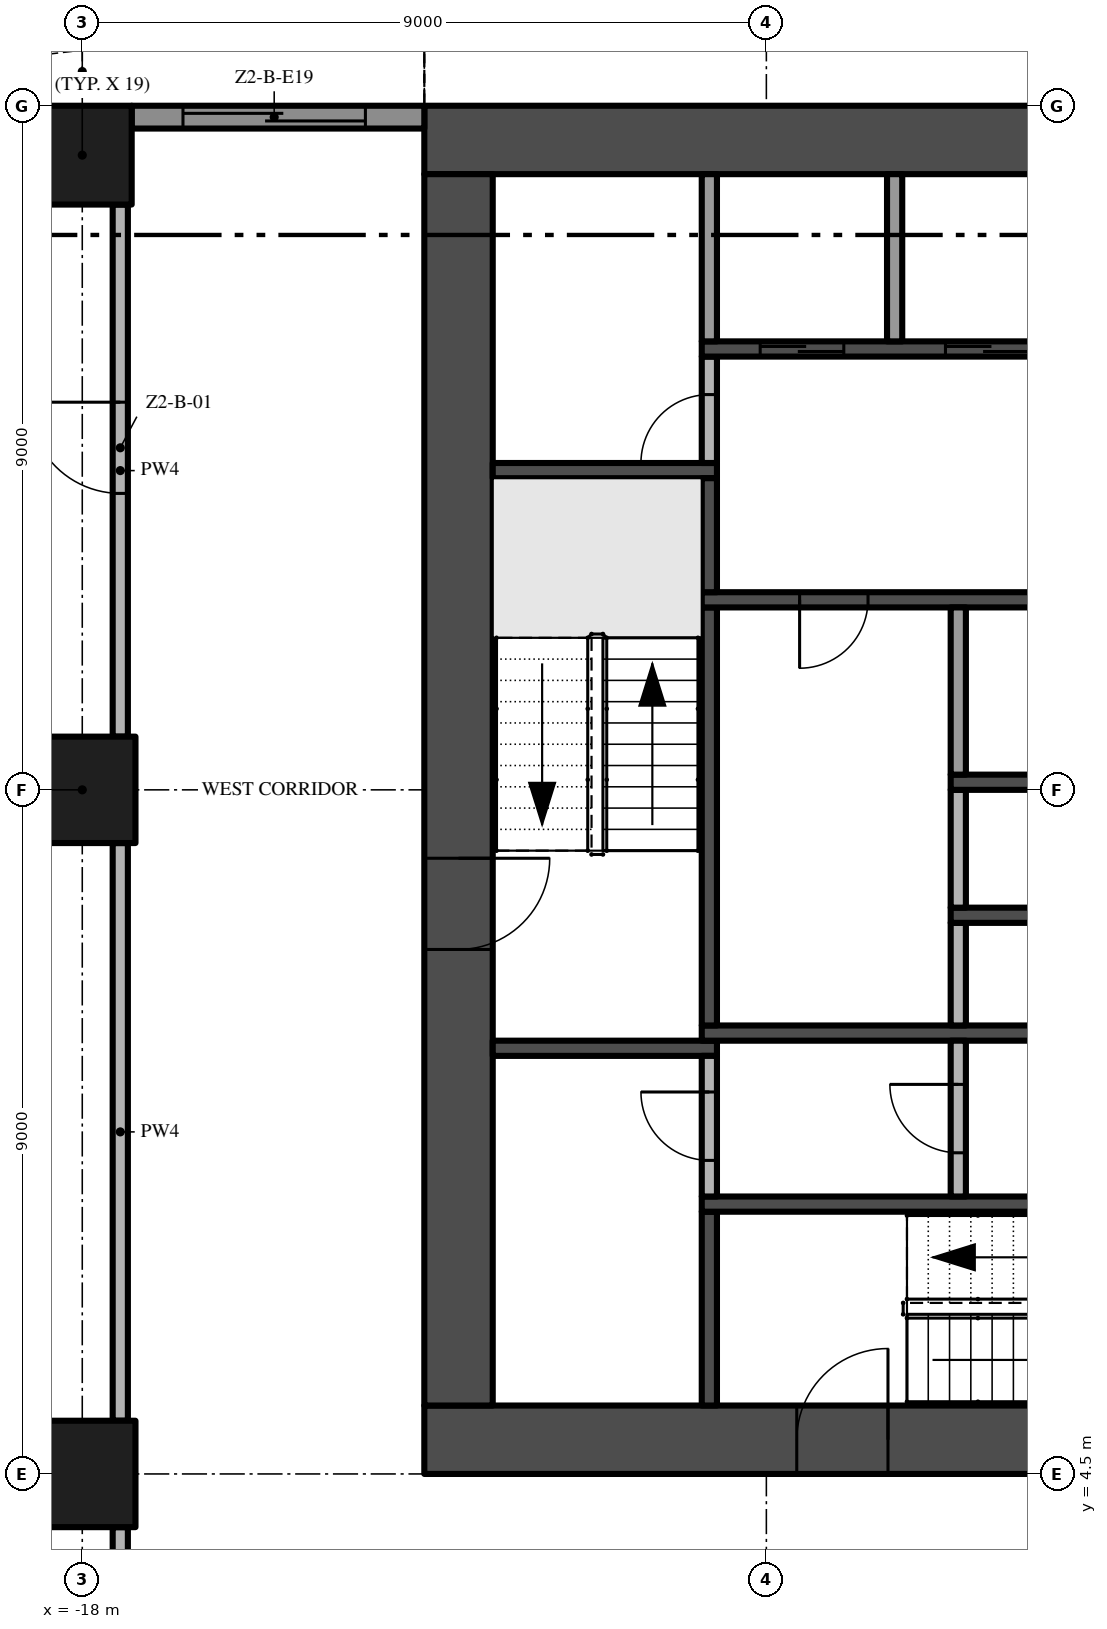
"""IFC4 building model, lengths in metres.
Left out: names, types, materials, properties, quantities, classifications, styles, units other than length and angle.
Written with IfcOpenShell. Run it as: python <this file> out.ifc"""

import sys

from ifc_helpers import new_model, si_unit, direction, frame, frame_2d, origin, origin_2d, place, context, subcontext, project, spatial, polyline, rectangle, outline, extrude, element, fill, save


model = new_model("IFC4")
c1 = context("Model", 3, precision=1e-05, world=origin(), true_north=direction((0.0, 1.0)))
c2 = subcontext(c1, "Body", "Model", "MODEL_VIEW")
j1 = project(units=[si_unit("LENGTHUNIT", "METRE"), si_unit("PLANEANGLEUNIT", "RADIAN")], contexts=[c1])
p1 = place(None, origin())
s1 = spatial("IfcSite", under=j1, at=p1, CompositionType="ELEMENT")
p2 = place(p1, origin())
s2 = spatial("IfcBuilding", under=s1, at=p2, CompositionType="ELEMENT")
p3 = place(p2, frame((0.0, 0.0, 88.4)))
s3 = spatial("IfcBuildingStorey", under=s2, at=p3, CompositionType="ELEMENT", Elevation=88.4)
p4 = place(p3, frame((-13.5, 4.95, -0.3), z_axis=(0.0, 0.0, 1.0), x_axis=(1.0, 0.0, 0.0)))
e1 = element("IfcWall", 1, at=p4, inside=s3, PredefinedType="SHEAR", context=c2, shape_type="SweptSolid", body=[
    extrude(rectangle(XDim=27.0, YDim=0.9, at=frame_2d((13.5, 0.0))), origin(), (0.0, 0.0, 1.0), 3.8),
])
p5 = place(p4, frame((12.0, 0.0, 0.3)))
e2 = element("IfcOpeningElement", 2, at=p5, cuts=e1, PredefinedType="OPENING", context=c2, shape_type="SweptSolid", body=[
    extrude(rectangle(XDim=3.0, YDim=2.4, at=frame_2d((1.5, 1.2))), frame((0.0, 0.46, 0.0), z_axis=(0.0, -1.0, 0.0), x_axis=(1.0, 0.0, 0.0)), (0.0, 0.0, 1.0), 0.92),
])
p6 = place(p4, frame((4.9, 0.0, 0.3)))
e3 = element("IfcOpeningElement", 3, at=p6, cuts=e1, PredefinedType="OPENING", context=c2, shape_type="SweptSolid", body=[
    extrude(rectangle(XDim=1.2, YDim=2.2, at=frame_2d((0.6, 1.1))), frame((0.0, 0.46, 0.0), z_axis=(0.0, -1.0, 0.0), x_axis=(1.0, 0.0, 0.0)), (0.0, 0.0, 1.0), 0.92),
])
p7 = place(p4, frame((20.75, 0.0, 0.3)))
e4 = element("IfcOpeningElement", 4, at=p7, cuts=e1, PredefinedType="OPENING", context=c2, shape_type="SweptSolid", body=[
    extrude(rectangle(XDim=1.5, YDim=2.2, at=frame_2d((0.75, 1.1))), frame((0.0, 0.46, 0.0), z_axis=(0.0, -1.0, 0.0), x_axis=(1.0, 0.0, 0.0)), (0.0, 0.0, 1.0), 0.92),
])
p8 = place(p4, frame((17.4, 0.0, 0.3)))
e5 = element("IfcOpeningElement", 5, at=p8, cuts=e1, PredefinedType="OPENING", context=c2, shape_type="SweptSolid", body=[
    extrude(rectangle(XDim=1.2, YDim=2.2, at=frame_2d((0.6, 1.1))), frame((0.0, 0.46, 0.0), z_axis=(0.0, -1.0, 0.0), x_axis=(1.0, 0.0, 0.0)), (0.0, 0.0, 1.0), 0.92),
])
p9 = place(p3, frame((13.5, 22.05, -0.3), z_axis=(0.0, 0.0, 1.0), x_axis=(-1.0, 0.0, 0.0)))
e6 = element("IfcWall", 6, at=p9, inside=s3, PredefinedType="SHEAR", context=c2, shape_type="SweptSolid", body=[
    extrude(rectangle(XDim=27.0, YDim=0.9, at=frame_2d((13.5, 0.0))), origin(), (0.0, 0.0, 1.0), 3.8),
])
p10 = place(p3, frame((-13.05, 21.6, -0.3), z_axis=(0.0, 0.0, 1.0), x_axis=(0.0, -1.0, 0.0)))
e7 = element("IfcWall", 7, at=p10, inside=s3, PredefinedType="SHEAR", context=c2, shape_type="SweptSolid", body=[
    extrude(rectangle(XDim=16.2, YDim=0.9, at=frame_2d((8.1, 0.0))), origin(), (0.0, 0.0, 1.0), 3.8),
])
p11 = place(p10, frame((9.0, 0.0, 0.3)))
e8 = element("IfcOpeningElement", 8, at=p11, cuts=e7, PredefinedType="OPENING", context=c2, shape_type="SweptSolid", body=[
    extrude(rectangle(XDim=1.2, YDim=2.2, at=frame_2d((0.6, 1.1))), frame((0.0, 0.46, 0.0), z_axis=(0.0, -1.0, 0.0), x_axis=(1.0, 0.0, 0.0)), (0.0, 0.0, 1.0), 0.92),
])
p12 = place(p3, frame((-18.0, 13.5, 0.0), z_axis=(0.0, 0.0, 1.0), x_axis=(1.0, 0.0, 0.0)))
e9 = element("IfcColumn", 9, at=p12, inside=s3, PredefinedType="COLUMN", context=c2, shape_type="SweptSolid", body=[
    extrude(rectangle(XDim=1.4, YDim=1.4, at=origin_2d()), origin(), (0.0, 0.0, 1.0), 3.5),
])
p13 = place(p3, frame((-18.0, 21.85, 0.0), z_axis=(0.0, 0.0, 1.0), x_axis=(1.0, 0.0, 0.0)))
e10 = element("IfcColumn", 10, at=p13, inside=s3, PredefinedType="COLUMN", context=c2, shape_type="SweptSolid", body=[
    extrude(rectangle(XDim=1.3, YDim=1.3, at=origin_2d()), origin(), (0.0, 0.0, 1.0), 3.5),
])
p14 = place(p3, frame((-18.0, 4.5, 0.0), z_axis=(0.0, 0.0, 1.0), x_axis=(1.0, 0.0, 0.0)))
e11 = element("IfcColumn", 11, at=p14, inside=s3, PredefinedType="COLUMN", context=c2, shape_type="SweptSolid", body=[
    extrude(rectangle(XDim=1.4, YDim=1.4, at=origin_2d()), origin(), (0.0, 0.0, 1.0), 3.5),
])
p15 = place(p3, frame((-17.35, 22.35, 0.0), z_axis=(0.0, 0.0, 1.0), x_axis=(1.0, 0.0, 0.0)))
e12 = element("IfcWall", 12, at=p15, inside=s3, PredefinedType="SOLIDWALL", context=c2, shape_type="SweptSolid", body=[
    extrude(rectangle(XDim=3.85, YDim=0.3, at=frame_2d((1.925, 0.0))), origin(), (0.0, 0.0, 1.0), 3.5),
])
p16 = place(p15, frame((0.675, 0.0, 0.0)))
e13 = element("IfcOpeningElement", 13, at=p16, cuts=e12, PredefinedType="OPENING", context=c2, shape_type="SweptSolid", body=[
    extrude(rectangle(XDim=2.4, YDim=2.4, at=frame_2d((1.2, 1.2))), frame((0.0, 0.16, 0.0), z_axis=(0.0, -1.0, 0.0), x_axis=(1.0, 0.0, 0.0)), (0.0, 0.0, 1.0), 0.32),
])
p17 = place(p3, origin())
e14 = element("IfcWall", 14, at=p17, inside=s3, PredefinedType="USERDEFINED", context=c2, shape_type="SweptSolid", body=[
    extrude(outline(polyline([(-13.5, 25.149), (-15.0, 24.488), (-16.5, 23.755), (-18.0, 23.231), (-19.125, 23.1), (-19.5, 23.115), (-21.0, 23.451), (-22.5, 24.112), (-22.601, 23.883), (-21.079, 23.213), (-19.533, 22.866), (-19.115, 22.849), (-17.944, 22.986), (-16.404, 23.524), (-14.895, 24.261), (-13.399, 24.92), (-13.5, 25.149)])), origin(), (0.0, 0.0, 1.0), 0.9),
])
for number, where, z_axis, x_axis in (
    (15, (-12.6, 10.1, 0.0), (0.0, 0.0, 1.0), (1.0, 0.0, 0.0)),
    (16, (-12.6, 17.7, 0.0), (0.0, 0.0, 1.0), (1.0, 0.0, 0.0)),
):
    element("IfcWall", number, at=place(p3, frame(where, z_axis=z_axis, x_axis=x_axis)), inside=s3, PredefinedType="SHEAR", context=c2, shape_type="SweptSolid", body=[
        extrude(rectangle(XDim=2.95, YDim=0.2, at=frame_2d((1.475, 0.0))), origin(), (0.0, 0.0, 1.0), 3.5),
    ])
p18 = place(p3, frame((-9.75, 5.4, 0.0), z_axis=(0.0, 0.0, 1.0), x_axis=(0.0, 1.0, 0.0)))
e17 = element("IfcWall", 17, at=p18, inside=s3, PredefinedType="SHEAR", context=c2, shape_type="SweptSolid", body=[
    extrude(rectangle(XDim=2.55, YDim=0.2, at=frame_2d((1.275, 0.0))), origin(), (0.0, 0.0, 1.0), 3.5),
])
p19 = place(p3, frame((-9.85, 8.05, 0.0), z_axis=(0.0, 0.0, 1.0), x_axis=(1.0, 0.0, 0.0)))
e18 = element("IfcWall", 18, at=p19, inside=s3, PredefinedType="SHEAR", context=c2, shape_type="SweptSolid", body=[
    extrude(rectangle(XDim=8.35, YDim=0.2, at=frame_2d((4.175, 0.0))), origin(), (0.0, 0.0, 1.0), 3.5),
])
p20 = place(p3, frame((-9.75, 8.15, 0.0), z_axis=(0.0, 0.0, 1.0), x_axis=(0.0, 1.0, 0.0)))
e19 = element("IfcWall", 19, at=p20, inside=s3, PredefinedType="PARTITIONING", context=c2, shape_type="SweptSolid", body=[
    extrude(rectangle(XDim=1.85, YDim=0.2, at=frame_2d((0.925, 0.0))), origin(), (0.0, 0.0, 1.0), 3.5),
])
p21 = place(p20, frame((0.475, 0.0, 0.0)))
e20 = element("IfcOpeningElement", 20, at=p21, cuts=e19, PredefinedType="OPENING", context=c2, shape_type="SweptSolid", body=[
    extrude(rectangle(XDim=0.9, YDim=2.1, at=frame_2d((0.45, 1.05))), frame((0.0, 0.11, 0.0), z_axis=(0.0, -1.0, 0.0), x_axis=(1.0, 0.0, 0.0)), (0.0, 0.0, 1.0), 0.22),
])
p22 = place(p3, frame((-9.85, 10.3, 0.0), z_axis=(0.0, 0.0, 1.0), x_axis=(1.0, 0.0, 0.0)))
e21 = element("IfcWall", 21, at=p22, inside=s3, PredefinedType="SHEAR", context=c2, shape_type="SweptSolid", body=[
    extrude(rectangle(XDim=8.35, YDim=0.2, at=frame_2d((4.175, 0.0))), origin(), (0.0, 0.0, 1.0), 3.5),
])
p23 = place(p3, frame((-9.75, 10.4, 0.0), z_axis=(0.0, 0.0, 1.0), x_axis=(0.0, 1.0, 0.0)))
e22 = element("IfcWall", 22, at=p23, inside=s3, PredefinedType="SHEAR", context=c2, shape_type="SweptSolid", body=[
    extrude(rectangle(XDim=5.5, YDim=0.2, at=frame_2d((2.75, 0.0))), origin(), (0.0, 0.0, 1.0), 3.5),
])
p24 = place(p3, frame((-1.5, 16.0, 0.0), z_axis=(0.0, 0.0, 1.0), x_axis=(-1.0, 0.0, 0.0)))
e23 = element("IfcWall", 23, at=p24, inside=s3, PredefinedType="SHEAR", context=c2, shape_type="SweptSolid", body=[
    extrude(rectangle(XDim=8.35, YDim=0.2, at=frame_2d((4.175, 0.0))), origin(), (0.0, 0.0, 1.0), 3.5),
])
p25 = place(p24, frame((6.162, 0.0, 0.0)))
e24 = element("IfcOpeningElement", 24, at=p25, cuts=e23, PredefinedType="OPENING", context=c2, shape_type="SweptSolid", body=[
    extrude(rectangle(XDim=0.9, YDim=2.1, at=frame_2d((0.45, 1.05))), frame((0.0, 0.11, 0.0), z_axis=(0.0, -1.0, 0.0), x_axis=(1.0, 0.0, 0.0)), (0.0, 0.0, 1.0), 0.22),
])
p26 = place(p3, frame((-9.75, 16.1, 0.0), z_axis=(0.0, 0.0, 1.0), x_axis=(0.0, 1.0, 0.0)))
e25 = element("IfcWall", 25, at=p26, inside=s3, PredefinedType="SHEAR", context=c2, shape_type="SweptSolid", body=[
    extrude(rectangle(XDim=1.5, YDim=0.2, at=frame_2d((0.75, 0.0))), origin(), (0.0, 0.0, 1.0), 3.5),
])
p27 = place(p3, frame((-9.75, 17.8, 0.0), z_axis=(0.0, 0.0, 1.0), x_axis=(0.0, 1.0, 0.0)))
e26 = element("IfcWall", 26, at=p27, inside=s3, PredefinedType="PARTITIONING", context=c2, shape_type="SweptSolid", body=[
    extrude(rectangle(XDim=1.4, YDim=0.2, at=frame_2d((0.7, 0.0))), origin(), (0.0, 0.0, 1.0), 3.5),
])
p28 = place(p27, origin())
e27 = element("IfcOpeningElement", 27, at=p28, cuts=e26, PredefinedType="OPENING", context=c2, shape_type="SweptSolid", body=[
    extrude(rectangle(XDim=0.9, YDim=2.1, at=frame_2d((0.45, 1.05))), frame((0.0, 0.11, 0.0), z_axis=(0.0, -1.0, 0.0), x_axis=(1.0, 0.0, 0.0)), (0.0, 0.0, 1.0), 0.22),
])
p29 = place(p3, frame((-9.85, 19.3, 0.0), z_axis=(0.0, 0.0, 1.0), x_axis=(1.0, 0.0, 0.0)))
e28 = element("IfcWall", 28, at=p29, inside=s3, PredefinedType="SHEAR", context=c2, shape_type="SweptSolid", body=[
    extrude(rectangle(XDim=19.7, YDim=0.2, at=frame_2d((9.85, 0.0))), origin(), (0.0, 0.0, 1.0), 3.5),
])
p30 = place(p29, frame((0.769, 0.0, 0.0)))
e29 = element("IfcOpeningElement", 29, at=p30, cuts=e28, PredefinedType="OPENING", context=c2, shape_type="SweptSolid", body=[
    extrude(rectangle(XDim=1.1, YDim=2.1, at=frame_2d((0.55, 1.05))), frame((0.0, 0.11, 0.0), z_axis=(0.0, -1.0, 0.0), x_axis=(1.0, 0.0, 0.0)), (0.0, 0.0, 1.0), 0.22),
])
p31 = place(p29, frame((3.206, 0.0, 0.0)))
e30 = element("IfcOpeningElement", 30, at=p31, cuts=e28, PredefinedType="OPENING", context=c2, shape_type="SweptSolid", body=[
    extrude(rectangle(XDim=1.1, YDim=2.1, at=frame_2d((0.55, 1.05))), frame((0.0, 0.11, 0.0), z_axis=(0.0, -1.0, 0.0), x_axis=(1.0, 0.0, 0.0)), (0.0, 0.0, 1.0), 0.22),
])
p32 = place(p29, frame((5.644, 0.0, 0.0)))
e31 = element("IfcOpeningElement", 31, at=p32, cuts=e28, PredefinedType="OPENING", context=c2, shape_type="SweptSolid", body=[
    extrude(rectangle(XDim=1.1, YDim=2.1, at=frame_2d((0.55, 1.05))), frame((0.0, 0.11, 0.0), z_axis=(0.0, -1.0, 0.0), x_axis=(1.0, 0.0, 0.0)), (0.0, 0.0, 1.0), 0.22),
])
p33 = place(p29, frame((8.081, 0.0, 0.0)))
e32 = element("IfcOpeningElement", 32, at=p33, cuts=e28, PredefinedType="OPENING", context=c2, shape_type="SweptSolid", body=[
    extrude(rectangle(XDim=1.1, YDim=2.1, at=frame_2d((0.55, 1.05))), frame((0.0, 0.11, 0.0), z_axis=(0.0, -1.0, 0.0), x_axis=(1.0, 0.0, 0.0)), (0.0, 0.0, 1.0), 0.22),
])
for number, where, z_axis, x_axis in (
    (33, (-9.75, 19.4, 0.0), (0.0, 0.0, 1.0), (0.0, 1.0, 0.0)),
    (34, (-7.312, 19.4, 0.0), (0.0, 0.0, 1.0), (0.0, 1.0, 0.0)),
):
    element("IfcWall", number, at=place(p3, frame(where, z_axis=z_axis, x_axis=x_axis)), inside=s3, PredefinedType="PARTITIONING", context=c2, shape_type="SweptSolid", body=[
        extrude(rectangle(XDim=2.2, YDim=0.2, at=frame_2d((1.1, 0.0))), origin(), (0.0, 0.0, 1.0), 3.5),
    ])
p34 = place(p3, frame((-6.475, 8.15, 0.0), z_axis=(0.0, 0.0, 1.0), x_axis=(0.0, 1.0, 0.0)))
e35 = element("IfcWall", 35, at=p34, inside=s3, PredefinedType="PARTITIONING", context=c2, shape_type="SweptSolid", body=[
    extrude(rectangle(XDim=2.05, YDim=0.2, at=frame_2d((1.025, 0.0))), origin(), (0.0, 0.0, 1.0), 3.5),
])
p35 = place(p34, frame((0.575, 0.0, 0.0)))
e36 = element("IfcOpeningElement", 36, at=p35, cuts=e35, PredefinedType="OPENING", context=c2, shape_type="SweptSolid", body=[
    extrude(rectangle(XDim=0.9, YDim=2.1, at=frame_2d((0.45, 1.05))), frame((0.0, 0.11, 0.0), z_axis=(0.0, -1.0, 0.0), x_axis=(1.0, 0.0, 0.0)), (0.0, 0.0, 1.0), 0.22),
])
p36 = place(p3, frame((-6.475, 10.4, 0.0), z_axis=(0.0, 0.0, 1.0), x_axis=(0.0, 1.0, 0.0)))
e37 = element("IfcWall", 37, at=p36, inside=s3, PredefinedType="PARTITIONING", context=c2, shape_type="SweptSolid", body=[
    extrude(rectangle(XDim=1.35, YDim=0.2, at=frame_2d((0.675, 0.0))), origin(), (0.0, 0.0, 1.0), 3.5),
])
p37 = place(p3, frame((-6.575, 11.85, 0.0), z_axis=(0.0, 0.0, 1.0), x_axis=(1.0, 0.0, 0.0)))
e38 = element("IfcWall", 38, at=p37, inside=s3, PredefinedType="SHEAR", context=c2, shape_type="SweptSolid", body=[
    extrude(rectangle(XDim=5.075, YDim=0.2, at=frame_2d((2.538, 0.0))), origin(), (0.0, 0.0, 1.0), 3.5),
])
p38 = place(p3, frame((-6.475, 11.95, 0.0), z_axis=(0.0, 0.0, 1.0), x_axis=(0.0, 1.0, 0.0)))
e39 = element("IfcWall", 39, at=p38, inside=s3, PredefinedType="PARTITIONING", context=c2, shape_type="SweptSolid", body=[
    extrude(rectangle(XDim=1.55, YDim=0.2, at=frame_2d((0.775, 0.0))), origin(), (0.0, 0.0, 1.0), 3.5),
])
p39 = place(p3, frame((-6.575, 13.6, 0.0), z_axis=(0.0, 0.0, 1.0), x_axis=(1.0, 0.0, 0.0)))
e40 = element("IfcWall", 40, at=p39, inside=s3, PredefinedType="SHEAR", context=c2, shape_type="SweptSolid", body=[
    extrude(rectangle(XDim=5.075, YDim=0.2, at=frame_2d((2.538, 0.0))), origin(), (0.0, 0.0, 1.0), 3.5),
])
p40 = place(p3, frame((-6.475, 13.7, 0.0), z_axis=(0.0, 0.0, 1.0), x_axis=(0.0, 1.0, 0.0)))
e41 = element("IfcWall", 41, at=p40, inside=s3, PredefinedType="PARTITIONING", context=c2, shape_type="SweptSolid", body=[
    extrude(rectangle(XDim=2.2, YDim=0.2, at=frame_2d((1.1, 0.0))), origin(), (0.0, 0.0, 1.0), 3.5),
])
p41 = place(p3, frame((-17.5, -0.2, 0.0), z_axis=(0.0, 0.0, 1.0), x_axis=(0.0, 1.0, 0.0)))
e42 = element("IfcWall", 42, at=p41, inside=s3, PredefinedType="PARTITIONING", context=c2, shape_type="SweptSolid", body=[
    extrude(rectangle(XDim=4.0, YDim=0.2, at=frame_2d((2.0, 0.0))), origin(), (0.0, 0.0, 1.0), 3.5),
])
p42 = place(p3, frame((-17.5, 5.2, 0.0), z_axis=(0.0, 0.0, 1.0), x_axis=(0.0, 1.0, 0.0)))
e43 = element("IfcWall", 43, at=p42, inside=s3, PredefinedType="PARTITIONING", context=c2, shape_type="SweptSolid", body=[
    extrude(rectangle(XDim=7.6, YDim=0.2, at=frame_2d((3.8, 0.0))), origin(), (0.0, 0.0, 1.0), 3.5),
])
p43 = place(p3, frame((-17.5, 14.2, 0.0), z_axis=(0.0, 0.0, 1.0), x_axis=(0.0, 1.0, 0.0)))
e44 = element("IfcWall", 44, at=p43, inside=s3, PredefinedType="PARTITIONING", context=c2, shape_type="SweptSolid", body=[
    extrude(rectangle(XDim=7.0, YDim=0.2, at=frame_2d((3.5, 0.0))), origin(), (0.0, 0.0, 1.0), 3.5),
])
p44 = place(p43, frame((3.2, 0.0, 0.0)))
e45 = element("IfcOpeningElement", 45, at=p44, cuts=e44, PredefinedType="OPENING", context=c2, shape_type="SweptSolid", body=[
    extrude(rectangle(XDim=1.2, YDim=2.4, at=frame_2d((0.6, 1.2))), frame((0.0, 0.11, 0.0), z_axis=(0.0, -1.0, 0.0), x_axis=(1.0, 0.0, 0.0)), (0.0, 0.0, 1.0), 0.22),
])
p45 = place(p16, origin())
e46 = element("IfcDoor", 46, at=p45, inside=s3, OperationType="SINGLE_SWING_LEFT", PredefinedType="DOOR", context=c2, shape_type="SweptSolid", body=[
    extrude(rectangle(XDim=2.4, YDim=2.4, at=frame_2d((1.2, 1.2))), frame((0.0, 0.025, 0.0), z_axis=(0.0, -1.0, 0.0), x_axis=(1.0, 0.0, 0.0)), (0.0, 0.0, 1.0), 0.05),
])
fill(e13, e46)
p46 = place(p11, frame((1.2, 0.0, 0.0), z_axis=(0.0, 0.0, 1.0), x_axis=(-1.0, 0.0, 0.0)))
e47 = element("IfcDoor", 47, at=p46, inside=s3, OperationType="SINGLE_SWING_RIGHT", PredefinedType="DOOR", context=c2, shape_type="SweptSolid", body=[
    extrude(rectangle(XDim=1.2, YDim=2.2, at=frame_2d((0.6, 1.1))), frame((0.0, 0.025, 0.0), z_axis=(0.0, -1.0, 0.0), x_axis=(1.0, 0.0, 0.0)), (0.0, 0.0, 1.0), 0.05),
])
fill(e8, e47)
p47 = place(p6, frame((1.2, 0.0, 0.0), z_axis=(0.0, 0.0, 1.0), x_axis=(-1.0, 0.0, 0.0)))
e48 = element("IfcDoor", 48, at=p47, inside=s3, OperationType="SINGLE_SWING_LEFT", PredefinedType="DOOR", context=c2, shape_type="SweptSolid", body=[
    extrude(rectangle(XDim=1.2, YDim=2.2, at=frame_2d((0.6, 1.1))), frame((0.0, 0.025, 0.0), z_axis=(0.0, -1.0, 0.0), x_axis=(1.0, 0.0, 0.0)), (0.0, 0.0, 1.0), 0.05),
])
fill(e3, e48)
p48 = place(p30, origin())
e49 = element("IfcDoor", 49, at=p48, inside=s3, OperationType="SLIDING_TO_LEFT", PredefinedType="DOOR", context=c2, shape_type="SweptSolid", body=[
    extrude(rectangle(XDim=1.1, YDim=2.1, at=frame_2d((0.55, 1.05))), frame((0.0, 0.025, 0.0), z_axis=(0.0, -1.0, 0.0), x_axis=(1.0, 0.0, 0.0)), (0.0, 0.0, 1.0), 0.05),
])
fill(e29, e49)
p49 = place(p31, origin())
e50 = element("IfcDoor", 50, at=p49, inside=s3, OperationType="SLIDING_TO_LEFT", PredefinedType="DOOR", context=c2, shape_type="SweptSolid", body=[
    extrude(rectangle(XDim=1.1, YDim=2.1, at=frame_2d((0.55, 1.05))), frame((0.0, 0.025, 0.0), z_axis=(0.0, -1.0, 0.0), x_axis=(1.0, 0.0, 0.0)), (0.0, 0.0, 1.0), 0.05),
])
fill(e30, e50)
p50 = place(p25, origin())
e51 = element("IfcDoor", 51, at=p50, inside=s3, OperationType="SINGLE_SWING_RIGHT", PredefinedType="DOOR", context=c2, shape_type="SweptSolid", body=[
    extrude(rectangle(XDim=0.9, YDim=2.1, at=frame_2d((0.45, 1.05))), frame((0.0, 0.025, 0.0), z_axis=(0.0, -1.0, 0.0), x_axis=(1.0, 0.0, 0.0)), (0.0, 0.0, 1.0), 0.05),
])
fill(e24, e51)
p51 = place(p28, origin())
e52 = element("IfcDoor", 52, at=p51, inside=s3, OperationType="SINGLE_SWING_LEFT", PredefinedType="DOOR", context=c2, shape_type="SweptSolid", body=[
    extrude(rectangle(XDim=0.9, YDim=2.1, at=frame_2d((0.45, 1.05))), frame((0.0, 0.025, 0.0), z_axis=(0.0, -1.0, 0.0), x_axis=(1.0, 0.0, 0.0)), (0.0, 0.0, 1.0), 0.05),
])
fill(e27, e52)
p52 = place(p35, origin())
e53 = element("IfcDoor", 53, at=p52, inside=s3, OperationType="SINGLE_SWING_RIGHT", PredefinedType="DOOR", context=c2, shape_type="SweptSolid", body=[
    extrude(rectangle(XDim=0.9, YDim=2.1, at=frame_2d((0.45, 1.05))), frame((0.0, 0.025, 0.0), z_axis=(0.0, -1.0, 0.0), x_axis=(1.0, 0.0, 0.0)), (0.0, 0.0, 1.0), 0.05),
])
fill(e36, e53)
p53 = place(p21, origin())
e54 = element("IfcDoor", 54, at=p53, inside=s3, OperationType="SINGLE_SWING_RIGHT", PredefinedType="DOOR", context=c2, shape_type="SweptSolid", body=[
    extrude(rectangle(XDim=0.9, YDim=2.1, at=frame_2d((0.45, 1.05))), frame((0.0, 0.025, 0.0), z_axis=(0.0, -1.0, 0.0), x_axis=(1.0, 0.0, 0.0)), (0.0, 0.0, 1.0), 0.05),
])
fill(e20, e54)
p54 = place(p44, origin())
e55 = element("IfcDoor", 55, at=p54, inside=s3, OperationType="SINGLE_SWING_RIGHT", PredefinedType="DOOR", context=c2, shape_type="SweptSolid", body=[
    extrude(rectangle(XDim=1.2, YDim=2.4, at=frame_2d((0.6, 1.2))), frame((0.0, 0.025, 0.0), z_axis=(0.0, -1.0, 0.0), x_axis=(1.0, 0.0, 0.0)), (0.0, 0.0, 1.0), 0.05),
])
fill(e45, e55)
save(model, sys.argv[1])
